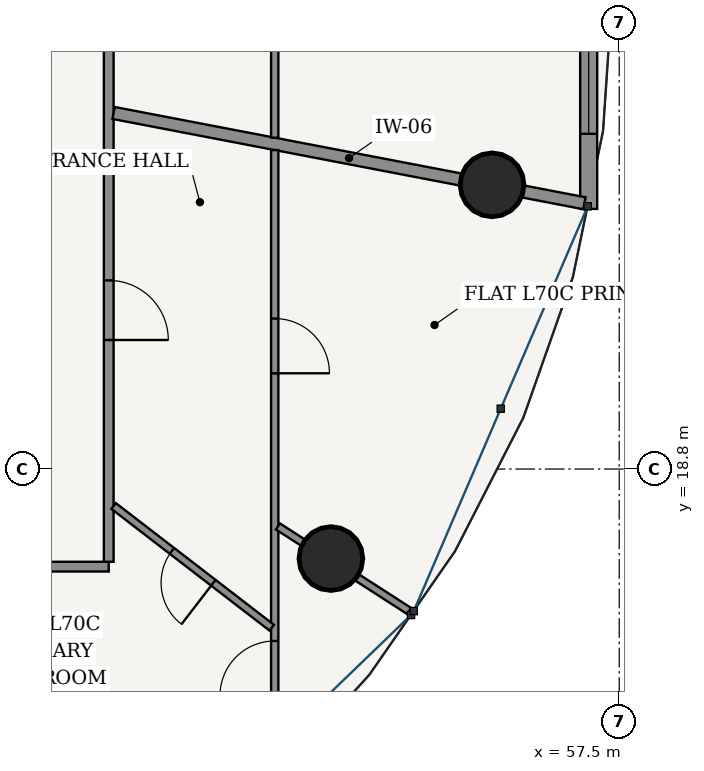
"""IFC4 building model, lengths in metres.
Left out: names, types, materials, properties, quantities, classifications, styles, units other than length and angle.
Written with IfcOpenShell. Run it as: python <this file> out.ifc"""

import sys

from ifc_helpers import new_model, si_unit, direction, frame, frame_2d, origin, origin_2d, place, context, subcontext, project, spatial, rectangle, hollow_circle, extrude, source, transform, mapped, element, fill, save


model = new_model("IFC4")
c1 = context("Model", 3, precision=1e-05, world=origin(), true_north=direction((-0.2419218956, 0.970295726276)))
c2 = subcontext(c1, "Body", "Model", "MODEL_VIEW")
j1 = project(units=[si_unit("LENGTHUNIT", "METRE"), si_unit("PLANEANGLEUNIT", "RADIAN")], contexts=[c1])
p1 = place(None, origin())
s1 = spatial("IfcSite", under=j1, at=p1, CompositionType="ELEMENT")
p2 = place(p1, origin())
s2 = spatial("IfcBuilding", under=s1, at=p2, CompositionType="ELEMENT")
p3 = place(p2, frame((0.0, 0.0, 266.95)))
s3 = spatial("IfcBuildingStorey", under=s2, at=p3, CompositionType="ELEMENT", Elevation=266.95)
for number, where, z_axis, x_axis in (
    (1, (52.759, 17.328, 0.0), (0.0, 0.0, 1.0), (1.0, 0.0, 0.0)),
    (2, (55.409, 23.474, 0.0), (0.0, 0.0, 1.0), (1.0, 0.0, 0.0)),
):
    element("IfcColumn", number, at=place(p3, frame(where, z_axis=z_axis, x_axis=x_axis)), inside=s3, PredefinedType="COLUMN", context=c2, shape_type="SweptSolid", body=[
        extrude(hollow_circle(Radius=0.525, WallThickness=0.035, at=origin_2d()), origin(), (0.0, 0.0, 1.0), 3.75),
    ])
p4 = place(p3, frame((56.998, 23.078, 0.0), z_axis=(0.0, 0.0, 1.0), x_axis=(0.0, 1.0, 0.0)))
e3 = element("IfcWall", 3, at=p4, inside=s3, PredefinedType="SOLIDWALL", context=c2, shape_type="SweptSolid", body=[
    extrude(rectangle(XDim=7.445, YDim=0.28, at=frame_2d((3.722, 0.0))), origin(), (0.0, 0.0, 1.0), 3.49),
])
p5 = place(p4, frame((1.235, 0.0, 0.85)))
e4 = element("IfcOpeningElement", 4, at=p5, cuts=e3, PredefinedType="OPENING", context=c2, shape_type="SweptSolid", body=[
    extrude(rectangle(XDim=1.55, YDim=1.95, at=frame_2d((0.775, 0.975))), frame((0.0, 0.15, 0.0), z_axis=(0.0, -1.0, 0.0), x_axis=(1.0, 0.0, 0.0)), (0.0, 0.0, 1.0), 0.3),
])
p6 = place(p4, frame((4.66, 0.0, 0.85)))
e5 = element("IfcOpeningElement", 5, at=p6, cuts=e3, PredefinedType="OPENING", context=c2, shape_type="SweptSolid", body=[
    extrude(rectangle(XDim=1.55, YDim=1.95, at=frame_2d((0.775, 0.975))), frame((0.0, 0.15, 0.0), z_axis=(0.0, -1.0, 0.0), x_axis=(1.0, 0.0, 0.0)), (0.0, 0.0, 1.0), 0.3),
])
p7 = place(p3, frame((26.895, 17.195, 0.0), z_axis=(0.0, 0.0, 1.0), x_axis=(1.0, 0.0, 0.0)))
e6 = element("IfcWall", 6, at=p7, inside=s3, PredefinedType="PARTITIONING", context=c2, shape_type="SweptSolid", body=[
    extrude(rectangle(XDim=22.21, YDim=0.16, at=frame_2d((11.105, 0.0))), origin(), (0.0, 0.0, 1.0), 3.015),
])
p8 = place(p3, frame((49.105, 17.275, 0.0), z_axis=(0.0, 0.0, 1.0), x_axis=(0.0, 1.0, 0.0)))
e7 = element("IfcWall", 7, at=p8, inside=s3, PredefinedType="PARTITIONING", context=c2, shape_type="SweptSolid", body=[
    extrude(rectangle(XDim=13.925, YDim=0.16, at=frame_2d((6.962, 0.0))), origin(), (0.0, 0.0, 1.0), 3.015),
])
p9 = place(p8, frame((3.647, 0.0, 0.0)))
e8 = element("IfcOpeningElement", 8, at=p9, cuts=e7, PredefinedType="OPENING", context=c2, shape_type="SweptSolid", body=[
    extrude(rectangle(XDim=0.98, YDim=2.2, at=frame_2d((0.49, 1.1))), frame((0.0, 0.09, 0.0), z_axis=(0.0, -1.0, 0.0), x_axis=(1.0, 0.0, 0.0)), (0.0, 0.0, 1.0), 0.18),
])
p10 = place(p3, frame((49.185, 24.656, 0.0), z_axis=(0.0, 0.0, 1.0), x_axis=(0.982109889803, -0.188308694305, 0.0)))
e9 = element("IfcWall", 9, at=p10, inside=s3, PredefinedType="PARTITIONING", context=c2, shape_type="SweptSolid", body=[
    extrude(rectangle(XDim=7.884, YDim=0.2, at=frame_2d((3.942, 0.0))), origin(), (0.0, 0.0, 1.0), 3.015),
])
p11 = place(p3, frame((51.835, 34.01, 0.0), z_axis=(0.0, 0.0, 1.0), x_axis=(0.0, -1.0, 0.0)))
e10 = element("IfcWall", 10, at=p11, inside=s3, PredefinedType="PARTITIONING", context=c2, shape_type="SweptSolid", body=[
    extrude(rectangle(XDim=9.761, YDim=0.12, at=frame_2d((4.88, 0.0))), origin(), (0.0, 0.0, 1.0), 3.015),
])
p12 = place(p3, frame((51.835, 24.045, 0.0), z_axis=(0.0, 0.0, 1.0), x_axis=(0.0, -1.0, 0.0)))
e11 = element("IfcWall", 11, at=p12, inside=s3, PredefinedType="PARTITIONING", context=c2, shape_type="SweptSolid", body=[
    extrude(rectangle(XDim=9.58, YDim=0.12, at=frame_2d((4.79, 0.0))), origin(), (0.0, 0.0, 1.0), 3.015),
])
p13 = place(p12, frame((2.771, 0.0, 0.0)))
e12 = element("IfcOpeningElement", 12, at=p13, cuts=e11, PredefinedType="OPENING", context=c2, shape_type="SweptSolid", body=[
    extrude(rectangle(XDim=0.9, YDim=2.15, at=frame_2d((0.45, 1.075))), frame((0.0, 0.07, 0.0), z_axis=(0.0, -1.0, 0.0), x_axis=(1.0, 0.0, 0.0)), (0.0, 0.0, 1.0), 0.14),
])
p14 = place(p12, frame((8.073, 0.0, 0.0)))
e13 = element("IfcOpeningElement", 13, at=p14, cuts=e11, PredefinedType="OPENING", context=c2, shape_type="SweptSolid", body=[
    extrude(rectangle(XDim=0.9, YDim=2.15, at=frame_2d((0.45, 1.075))), frame((0.0, 0.07, 0.0), z_axis=(0.0, -1.0, 0.0), x_axis=(1.0, 0.0, 0.0)), (0.0, 0.0, 1.0), 0.14),
])
p15 = place(p3, frame((51.887, 17.856, 0.0), z_axis=(0.0, 0.0, 1.0), x_axis=(0.840708587197, -0.54148783127, 0.0)))
e14 = element("IfcWall", 14, at=p15, inside=s3, PredefinedType="PARTITIONING", context=c2, shape_type="SweptSolid", body=[
    extrude(rectangle(XDim=2.568, YDim=0.12, at=frame_2d((1.284, 0.0))), origin(), (0.0, 0.0, 1.0), 3.015),
])
p16 = place(p3, frame((49.185, 18.192, 0.0), z_axis=(0.0, 0.0, 1.0), x_axis=(0.792502290575, -0.609868936275, 0.0)))
e15 = element("IfcWall", 15, at=p16, inside=s3, PredefinedType="PARTITIONING", context=c2, shape_type="SweptSolid", body=[
    extrude(rectangle(XDim=3.282, YDim=0.12, at=frame_2d((1.641, 0.0))), origin(), (0.0, 0.0, 1.0), 3.121),
])
p17 = place(p16, frame((1.211, 0.0, 0.0)))
e16 = element("IfcOpeningElement", 16, at=p17, cuts=e15, PredefinedType="OPENING", context=c2, shape_type="SweptSolid", body=[
    extrude(rectangle(XDim=0.86, YDim=2.15, at=frame_2d((0.43, 1.075))), frame((0.0, 0.07, 0.0), z_axis=(0.0, -1.0, 0.0), x_axis=(1.0, 0.0, 0.0)), (0.0, 0.0, 1.0), 0.14),
])
m1 = source(origin(), c2, "Body", "SweptSolid", [
    extrude(rectangle(XDim=1.55, YDim=1.95, at=frame_2d((0.775, 0.975))), frame((0.0, 0.03, 0.0), z_axis=(0.0, -1.0, 0.0), x_axis=(1.0, 0.0, 0.0)), (0.0, 0.0, 1.0), 0.06),
])
p18 = place(p5, origin())
e17 = element("IfcWindow", 17, at=p18, inside=s3, PartitioningType="SINGLE_PANEL", PredefinedType="WINDOW", context=c2, shape_type="MappedRepresentation", body=[
    mapped(m1, transform((0.0, 0.0, 0.0), scale=1.0)),
])
fill(e4, e17)
m2 = source(origin(), c2, "Body", "SweptSolid", [
    extrude(rectangle(XDim=0.98, YDim=2.2, at=frame_2d((0.49, 1.1))), frame((0.0, 0.025, 0.0), z_axis=(0.0, -1.0, 0.0), x_axis=(1.0, 0.0, 0.0)), (0.0, 0.0, 1.0), 0.05),
])
p19 = place(p9, frame((0.98, 0.0, 0.0), z_axis=(0.0, 0.0, 1.0), x_axis=(-1.0, 0.0, 0.0)))
e18 = element("IfcDoor", 18, at=p19, inside=s3, OperationType="SINGLE_SWING_RIGHT", PredefinedType="DOOR", context=c2, shape_type="MappedRepresentation", body=[
    mapped(m2, transform((0.0, 0.0, 0.0), scale=1.0)),
])
fill(e8, e18)
m3 = source(origin(), c2, "Body", "SweptSolid", [
    extrude(rectangle(XDim=0.86, YDim=2.15, at=frame_2d((0.43, 1.075))), frame((0.0, 0.025, 0.0), z_axis=(0.0, -1.0, 0.0), x_axis=(1.0, 0.0, 0.0)), (0.0, 0.0, 1.0), 0.05),
])
p20 = place(p17, frame((0.86, 0.0, 0.0), z_axis=(0.0, 0.0, 1.0), x_axis=(-1.0, 0.0, 0.0)))
e19 = element("IfcDoor", 19, at=p20, inside=s3, OperationType="SINGLE_SWING_LEFT", PredefinedType="DOOR", context=c2, shape_type="MappedRepresentation", body=[
    mapped(m3, transform((0.0, 0.0, 0.0), scale=1.0)),
])
fill(e16, e19)
m4 = source(origin(), c2, "Body", "SweptSolid", [
    extrude(rectangle(XDim=0.9, YDim=2.15, at=frame_2d((0.45, 1.075))), frame((0.0, 0.025, 0.0), z_axis=(0.0, -1.0, 0.0), x_axis=(1.0, 0.0, 0.0)), (0.0, 0.0, 1.0), 0.05),
])
p21 = place(p13, origin())
e20 = element("IfcDoor", 20, at=p21, inside=s3, OperationType="SINGLE_SWING_RIGHT", PredefinedType="DOOR", context=c2, shape_type="MappedRepresentation", body=[
    mapped(m4, transform((0.0, 0.0, 0.0), scale=1.0)),
])
fill(e12, e20)
p22 = place(p14, frame((0.9, 0.0, 0.0), z_axis=(0.0, 0.0, 1.0), x_axis=(-1.0, 0.0, 0.0)))
e21 = element("IfcDoor", 21, at=p22, inside=s3, OperationType="SINGLE_SWING_LEFT", PredefinedType="DOOR", context=c2, shape_type="MappedRepresentation", body=[
    mapped(m4, transform((0.0, 0.0, 0.0), scale=1.0)),
])
fill(e13, e21)
save(model, sys.argv[1])
